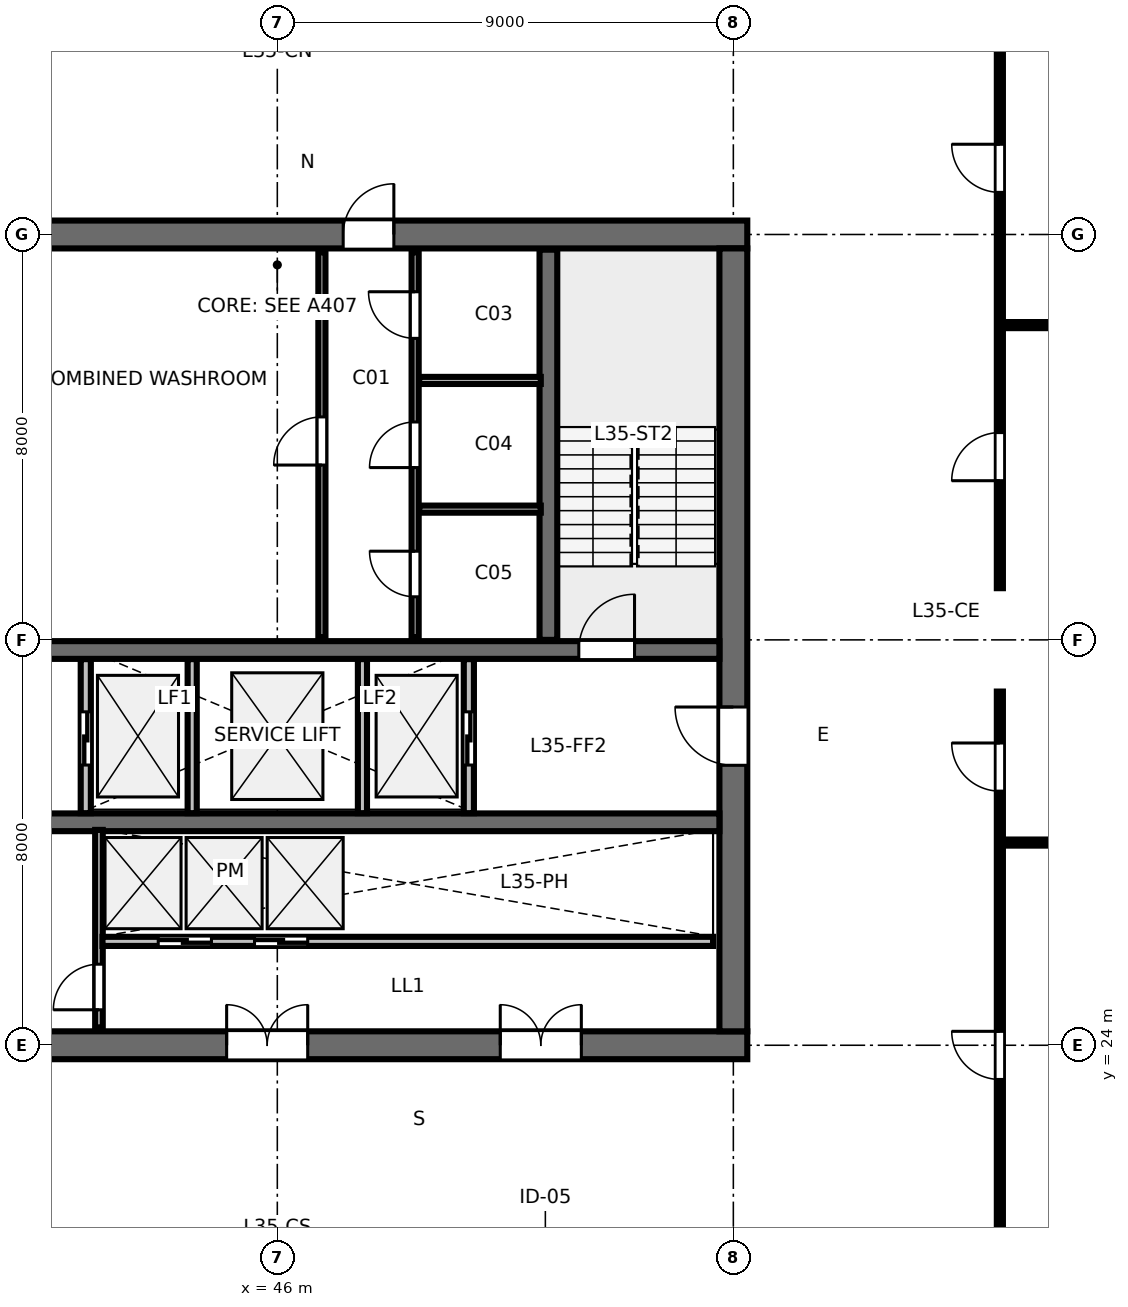
"""IFC4 building model, lengths in metres.
Left out: names, types, materials, properties, quantities, classifications, styles, units other than length and angle.
Written with IfcOpenShell. Run it as: python <this file> out.ifc"""

import sys

from ifc_helpers import new_model, si_unit, direction, frame, frame_2d, origin, place, context, subcontext, project, spatial, rectangle, extrude, element, fill, save


model = new_model("IFC4")
c1 = context("Model", 3, precision=1e-05, world=origin(), true_north=direction((0.0, 1.0)))
c2 = subcontext(c1, "Body", "Model", "MODEL_VIEW")
j1 = project(units=[si_unit("LENGTHUNIT", "METRE"), si_unit("PLANEANGLEUNIT", "RADIAN")], contexts=[c1])
p1 = place(None, origin())
s1 = spatial("IfcSite", under=j1, at=p1, CompositionType="ELEMENT")
p2 = place(p1, origin())
s2 = spatial("IfcBuilding", under=s1, at=p2, CompositionType="ELEMENT")
p3 = place(p2, frame((0.0, 0.0, 134.8)))
s3 = spatial("IfcBuildingStorey", under=s2, at=p3, CompositionType="ELEMENT", Elevation=134.8)
p4 = place(p3, frame((36.725, 24.0, 0.0), z_axis=(0.0, 0.0, 1.0), x_axis=(1.0, 0.0, 0.0)))
e1 = element("IfcWall", 1, at=p4, inside=s3, PredefinedType="SHEAR", context=c2, shape_type="SweptSolid", body=[
    extrude(rectangle(XDim=18.55, YDim=0.55, at=frame_2d((9.275, 0.0))), origin(), (0.0, 0.0, 1.0), 3.36),
])
p5 = place(p4, frame((8.275, 0.0, 0.0)))
e2 = element("IfcOpeningElement", 2, at=p5, cuts=e1, PredefinedType="OPENING", context=c2, shape_type="SweptSolid", body=[
    extrude(rectangle(XDim=1.6, YDim=2.15, at=frame_2d((0.8, 1.075))), frame((0.0, 0.285, 0.0), z_axis=(0.0, -1.0, 0.0), x_axis=(1.0, 0.0, 0.0)), (0.0, 0.0, 1.0), 0.57),
])
p6 = place(p4, frame((13.675, 0.0, 0.0)))
e3 = element("IfcOpeningElement", 3, at=p6, cuts=e1, PredefinedType="OPENING", context=c2, shape_type="SweptSolid", body=[
    extrude(rectangle(XDim=1.6, YDim=2.15, at=frame_2d((0.8, 1.075))), frame((0.0, 0.285, 0.0), z_axis=(0.0, -1.0, 0.0), x_axis=(1.0, 0.0, 0.0)), (0.0, 0.0, 1.0), 0.57),
])
p7 = place(p3, frame((36.725, 40.0, 0.0), z_axis=(0.0, 0.0, 1.0), x_axis=(1.0, 0.0, 0.0)))
e4 = element("IfcWall", 4, at=p7, inside=s3, PredefinedType="SHEAR", context=c2, shape_type="SweptSolid", body=[
    extrude(rectangle(XDim=18.55, YDim=0.55, at=frame_2d((9.275, 0.0))), origin(), (0.0, 0.0, 1.0), 3.36),
])
p8 = place(p7, frame((10.575, 0.0, 0.0)))
e5 = element("IfcOpeningElement", 5, at=p8, cuts=e4, PredefinedType="OPENING", context=c2, shape_type="SweptSolid", body=[
    extrude(rectangle(XDim=1.0, YDim=2.15, at=frame_2d((0.5, 1.075))), frame((0.0, 0.285, 0.0), z_axis=(0.0, -1.0, 0.0), x_axis=(1.0, 0.0, 0.0)), (0.0, 0.0, 1.0), 0.57),
])
p9 = place(p3, frame((55.0, 24.275, 0.0), z_axis=(0.0, 0.0, 1.0), x_axis=(0.0, 1.0, 0.0)))
e6 = element("IfcWall", 6, at=p9, inside=s3, PredefinedType="SHEAR", context=c2, shape_type="SweptSolid", body=[
    extrude(rectangle(XDim=15.45, YDim=0.55, at=frame_2d((7.725, 0.0))), origin(), (0.0, 0.0, 1.0), 3.36),
])
p10 = place(p9, frame((5.25, 0.0, 0.0)))
e7 = element("IfcOpeningElement", 7, at=p10, cuts=e6, PredefinedType="OPENING", context=c2, shape_type="SweptSolid", body=[
    extrude(rectangle(XDim=1.15, YDim=2.15, at=frame_2d((0.575, 1.075))), frame((0.0, 0.285, 0.0), z_axis=(0.0, -1.0, 0.0), x_axis=(1.0, 0.0, 0.0)), (0.0, 0.0, 1.0), 0.57),
])
p11 = place(p3, frame((37.275, 31.8, 0.0), z_axis=(0.0, 0.0, 1.0), x_axis=(1.0, 0.0, 0.0)))
e8 = element("IfcWall", 8, at=p11, inside=s3, PredefinedType="SHEAR", context=c2, shape_type="SweptSolid", body=[
    extrude(rectangle(XDim=17.45, YDim=0.35, at=frame_2d((8.725, 0.0))), origin(), (0.0, 0.0, 1.0), 3.36),
])
p12 = place(p11, frame((0.775, 0.0, 0.0)))
e9 = element("IfcOpeningElement", 9, at=p12, cuts=e8, PredefinedType="OPENING", context=c2, shape_type="SweptSolid", body=[
    extrude(rectangle(XDim=1.1, YDim=2.15, at=frame_2d((0.55, 1.075))), frame((0.0, 0.185, 0.0), z_axis=(0.0, -1.0, 0.0), x_axis=(1.0, 0.0, 0.0)), (0.0, 0.0, 1.0), 0.37),
])
p13 = place(p11, frame((14.675, 0.0, 0.0)))
e10 = element("IfcOpeningElement", 10, at=p13, cuts=e8, PredefinedType="OPENING", context=c2, shape_type="SweptSolid", body=[
    extrude(rectangle(XDim=1.1, YDim=2.15, at=frame_2d((0.55, 1.075))), frame((0.0, 0.185, 0.0), z_axis=(0.0, -1.0, 0.0), x_axis=(1.0, 0.0, 0.0)), (0.0, 0.0, 1.0), 0.37),
])
p14 = place(p3, frame((37.275, 28.4, 0.0), z_axis=(0.0, 0.0, 1.0), x_axis=(1.0, 0.0, 0.0)))
e11 = element("IfcWall", 11, at=p14, inside=s3, PredefinedType="SHEAR", context=c2, shape_type="SweptSolid", body=[
    extrude(rectangle(XDim=17.45, YDim=0.35, at=frame_2d((8.725, 0.0))), origin(), (0.0, 0.0, 1.0), 3.36),
])
p15 = place(p3, frame((51.35, 32.0, 0.0), z_axis=(0.0, 0.0, 1.0), x_axis=(0.0, 1.0, 0.0)))
e12 = element("IfcWall", 12, at=p15, inside=s3, PredefinedType="SHEAR", context=c2, shape_type="SweptSolid", body=[
    extrude(rectangle(XDim=7.7, YDim=0.35, at=frame_2d((3.85, 0.0))), origin(), (0.0, 0.0, 1.0), 3.6),
])
p16 = place(p3, frame((46.88, 32.05, 0.0), z_axis=(0.0, 0.0, 1.0), x_axis=(0.0, 1.0, 0.0)))
e13 = element("IfcWall", 13, at=p16, inside=s3, PredefinedType="PARTITIONING", context=c2, shape_type="SweptSolid", body=[
    extrude(rectangle(XDim=7.6, YDim=0.14, at=frame_2d((3.8, 0.0))), origin(), (0.0, 0.0, 1.0), 3.36),
])
p17 = place(p16, frame((3.4, 0.0, 0.0)))
e14 = element("IfcOpeningElement", 14, at=p17, cuts=e13, PredefinedType="OPENING", context=c2, shape_type="SweptSolid", body=[
    extrude(rectangle(XDim=0.95, YDim=2.15, at=frame_2d((0.475, 1.075))), frame((0.0, 0.08, 0.0), z_axis=(0.0, -1.0, 0.0), x_axis=(1.0, 0.0, 0.0)), (0.0, 0.0, 1.0), 0.16),
])
p18 = place(p3, frame((48.72, 32.05, 0.0), z_axis=(0.0, 0.0, 1.0), x_axis=(0.0, 1.0, 0.0)))
e15 = element("IfcWall", 15, at=p18, inside=s3, PredefinedType="PARTITIONING", context=c2, shape_type="SweptSolid", body=[
    extrude(rectangle(XDim=7.6, YDim=0.14, at=frame_2d((3.8, 0.0))), origin(), (0.0, 0.0, 1.0), 3.36),
])
p19 = place(p18, frame((0.8, 0.0, 0.0)))
e16 = element("IfcOpeningElement", 16, at=p19, cuts=e15, PredefinedType="OPENING", context=c2, shape_type="SweptSolid", body=[
    extrude(rectangle(XDim=0.9, YDim=2.15, at=frame_2d((0.45, 1.075))), frame((0.0, 0.08, 0.0), z_axis=(0.0, -1.0, 0.0), x_axis=(1.0, 0.0, 0.0)), (0.0, 0.0, 1.0), 0.16),
])
p20 = place(p18, frame((3.35, 0.0, 0.0)))
e17 = element("IfcOpeningElement", 17, at=p20, cuts=e15, PredefinedType="OPENING", context=c2, shape_type="SweptSolid", body=[
    extrude(rectangle(XDim=0.9, YDim=2.15, at=frame_2d((0.45, 1.075))), frame((0.0, 0.08, 0.0), z_axis=(0.0, -1.0, 0.0), x_axis=(1.0, 0.0, 0.0)), (0.0, 0.0, 1.0), 0.16),
])
p21 = place(p18, frame((5.9, 0.0, 0.0)))
e18 = element("IfcOpeningElement", 18, at=p21, cuts=e15, PredefinedType="OPENING", context=c2, shape_type="SweptSolid", body=[
    extrude(rectangle(XDim=0.92, YDim=2.15, at=frame_2d((0.46, 1.075))), frame((0.0, 0.08, 0.0), z_axis=(0.0, -1.0, 0.0), x_axis=(1.0, 0.0, 0.0)), (0.0, 0.0, 1.0), 0.16),
])
for number, where, z_axis, x_axis in (
    (19, (48.8, 34.58, 0.0), (0.0, 0.0, 1.0), (1.0, 0.0, 0.0)),
    (20, (48.8, 37.12, 0.0), (0.0, 0.0, 1.0), (1.0, 0.0, 0.0)),
):
    element("IfcWall", number, at=place(p3, frame(where, z_axis=z_axis, x_axis=x_axis)), inside=s3, PredefinedType="PARTITIONING", context=c2, shape_type="SweptSolid", body=[
        extrude(rectangle(XDim=2.4, YDim=0.14, at=frame_2d((1.2, 0.0))), origin(), (0.0, 0.0, 1.0), 3.36),
    ])
p22 = place(p3, frame((42.22, 28.58, 0.0), z_axis=(0.0, 0.0, 1.0), x_axis=(0.0, 1.0, 0.0)))
e21 = element("IfcWall", 21, at=p22, inside=s3, PredefinedType="PARTITIONING", context=c2, shape_type="SweptSolid", body=[
    extrude(rectangle(XDim=3.04, YDim=0.2, at=frame_2d((1.52, 0.0))), origin(), (0.0, 0.0, 1.0), 3.36),
])
p23 = place(p22, frame((0.95, 0.0, 0.0)))
e22 = element("IfcOpeningElement", 22, at=p23, cuts=e21, PredefinedType="OPENING", context=c2, shape_type="SweptSolid", body=[
    extrude(rectangle(XDim=1.05, YDim=2.15, at=frame_2d((0.525, 1.075))), frame((0.0, 0.11, 0.0), z_axis=(0.0, -1.0, 0.0), x_axis=(1.0, 0.0, 0.0)), (0.0, 0.0, 1.0), 0.22),
])
p24 = place(p3, frame((49.78, 28.58, 0.0), z_axis=(0.0, 0.0, 1.0), x_axis=(0.0, 1.0, 0.0)))
e23 = element("IfcWall", 23, at=p24, inside=s3, PredefinedType="PARTITIONING", context=c2, shape_type="SweptSolid", body=[
    extrude(rectangle(XDim=3.04, YDim=0.2, at=frame_2d((1.52, 0.0))), origin(), (0.0, 0.0, 1.0), 3.36),
])
p25 = place(p24, frame((0.95, 0.0, 0.0)))
e24 = element("IfcOpeningElement", 24, at=p25, cuts=e23, PredefinedType="OPENING", context=c2, shape_type="SweptSolid", body=[
    extrude(rectangle(XDim=1.05, YDim=2.15, at=frame_2d((0.525, 1.075))), frame((0.0, 0.11, 0.0), z_axis=(0.0, -1.0, 0.0), x_axis=(1.0, 0.0, 0.0)), (0.0, 0.0, 1.0), 0.22),
])
for number, where, z_axis, x_axis in (
    (25, (44.32, 28.58, 0.0), (0.0, 0.0, 1.0), (0.0, 1.0, 0.0)),
    (26, (47.68, 28.58, 0.0), (0.0, 0.0, 1.0), (0.0, 1.0, 0.0)),
):
    element("IfcWall", number, at=place(p3, frame(where, z_axis=z_axis, x_axis=x_axis)), inside=s3, PredefinedType="PARTITIONING", context=c2, shape_type="SweptSolid", body=[
        extrude(rectangle(XDim=3.04, YDim=0.18, at=frame_2d((1.52, 0.0))), origin(), (0.0, 0.0, 1.0), 3.36),
    ])
p26 = place(p3, frame((42.48, 24.35, 0.0), z_axis=(0.0, 0.0, 1.0), x_axis=(0.0, 1.0, 0.0)))
e27 = element("IfcWall", 27, at=p26, inside=s3, PredefinedType="PARTITIONING", context=c2, shape_type="SweptSolid", body=[
    extrude(rectangle(XDim=3.9, YDim=0.15, at=frame_2d((1.95, 0.0))), origin(), (0.0, 0.0, 1.0), 3.36),
])
p27 = place(p26, frame((0.35, 0.0, 0.0)))
e28 = element("IfcOpeningElement", 28, at=p27, cuts=e27, PredefinedType="OPENING", context=c2, shape_type="SweptSolid", body=[
    extrude(rectangle(XDim=0.9, YDim=2.15, at=frame_2d((0.45, 1.075))), frame((0.0, 0.085, 0.0), z_axis=(0.0, -1.0, 0.0), x_axis=(1.0, 0.0, 0.0)), (0.0, 0.0, 1.0), 0.17),
])
p28 = place(p3, frame((42.55, 26.05, 0.0), z_axis=(0.0, 0.0, 1.0), x_axis=(1.0, 0.0, 0.0)))
e29 = element("IfcWall", 29, at=p28, inside=s3, PredefinedType="PARTITIONING", context=c2, shape_type="SweptSolid", body=[
    extrude(rectangle(XDim=12.05, YDim=0.18, at=frame_2d((6.025, 0.0))), origin(), (0.0, 0.0, 1.0), 3.36),
])
p29 = place(p28, frame((1.1, 0.0, 0.0)))
e30 = element("IfcOpeningElement", 30, at=p29, cuts=e29, PredefinedType="OPENING", context=c2, shape_type="SweptSolid", body=[
    extrude(rectangle(XDim=1.05, YDim=2.15, at=frame_2d((0.525, 1.075))), frame((0.0, 0.1, 0.0), z_axis=(0.0, -1.0, 0.0), x_axis=(1.0, 0.0, 0.0)), (0.0, 0.0, 1.0), 0.2),
])
p30 = place(p28, frame((3.0, 0.0, 0.0)))
e31 = element("IfcOpeningElement", 31, at=p30, cuts=e29, PredefinedType="OPENING", context=c2, shape_type="SweptSolid", body=[
    extrude(rectangle(XDim=1.05, YDim=2.15, at=frame_2d((0.525, 1.075))), frame((0.0, 0.1, 0.0), z_axis=(0.0, -1.0, 0.0), x_axis=(1.0, 0.0, 0.0)), (0.0, 0.0, 1.0), 0.2),
])
p31 = place(p3, frame((60.26, 28.0, 0.0), z_axis=(0.0, 0.0, 1.0), x_axis=(1.0, 0.0, 0.0)))
e32 = element("IfcWall", 32, at=p31, inside=s3, PredefinedType="PARTITIONING", context=c2, shape_type="SweptSolid", body=[
    extrude(rectangle(XDim=8.26, YDim=0.12, at=frame_2d((4.13, 0.0))), origin(), (0.0, 0.0, 1.0), 2.64),
])
p32 = place(p31, frame((1.4, 0.0, 0.0)))
e33 = element("IfcOpeningElement", 33, at=p32, cuts=e32, PredefinedType="OPENING", context=c2, shape_type="SweptSolid", body=[
    extrude(rectangle(XDim=0.9, YDim=2.15, at=frame_2d((0.45, 1.075))), frame((0.0, 0.07, 0.0), z_axis=(0.0, -1.0, 0.0), x_axis=(1.0, 0.0, 0.0)), (0.0, 0.0, 1.0), 0.14),
])
p33 = place(p3, frame((60.26, 38.212, 0.0), z_axis=(0.0, 0.0, 1.0), x_axis=(1.0, 0.0, 0.0)))
e34 = element("IfcWall", 34, at=p33, inside=s3, PredefinedType="PARTITIONING", context=c2, shape_type="SweptSolid", body=[
    extrude(rectangle(XDim=8.26, YDim=0.12, at=frame_2d((4.13, 0.0))), origin(), (0.0, 0.0, 1.0), 2.64),
])
p34 = place(p33, frame((1.4, 0.0, 0.0)))
e35 = element("IfcOpeningElement", 35, at=p34, cuts=e34, PredefinedType="OPENING", context=c2, shape_type="SweptSolid", body=[
    extrude(rectangle(XDim=0.9, YDim=2.15, at=frame_2d((0.45, 1.075))), frame((0.0, 0.07, 0.0), z_axis=(0.0, -1.0, 0.0), x_axis=(1.0, 0.0, 0.0)), (0.0, 0.0, 1.0), 0.14),
])
p35 = place(p3, frame((60.26, 19.4, 0.0), z_axis=(0.0, 0.0, 1.0), x_axis=(0.0, 1.0, 0.0)))
e36 = element("IfcWall", 36, at=p35, inside=s3, PredefinedType="PARTITIONING", context=c2, shape_type="SweptSolid", body=[
    extrude(rectangle(XDim=11.58, YDim=0.12, at=frame_2d((5.79, 0.0))), origin(), (0.0, 0.0, 1.0), 2.64),
])
p36 = place(p35, frame((3.925, 0.0, 0.0)))
e37 = element("IfcOpeningElement", 37, at=p36, cuts=e36, PredefinedType="OPENING", context=c2, shape_type="SweptSolid", body=[
    extrude(rectangle(XDim=0.95, YDim=2.15, at=frame_2d((0.475, 1.075))), frame((0.0, 0.07, 0.0), z_axis=(0.0, -1.0, 0.0), x_axis=(1.0, 0.0, 0.0)), (0.0, 0.0, 1.0), 0.14),
])
p37 = place(p35, frame((9.615, 0.0, 0.0)))
e38 = element("IfcOpeningElement", 38, at=p37, cuts=e36, PredefinedType="OPENING", context=c2, shape_type="SweptSolid", body=[
    extrude(rectangle(XDim=0.95, YDim=2.15, at=frame_2d((0.475, 1.075))), frame((0.0, 0.07, 0.0), z_axis=(0.0, -1.0, 0.0), x_axis=(1.0, 0.0, 0.0)), (0.0, 0.0, 1.0), 0.14),
])
p38 = place(p3, frame((60.26, 33.02, 0.0), z_axis=(0.0, 0.0, 1.0), x_axis=(0.0, 1.0, 0.0)))
e39 = element("IfcWall", 39, at=p38, inside=s3, PredefinedType="PARTITIONING", context=c2, shape_type="SweptSolid", body=[
    extrude(rectangle(XDim=11.58, YDim=0.12, at=frame_2d((5.79, 0.0))), origin(), (0.0, 0.0, 1.0), 2.64),
])
p39 = place(p38, frame((2.121, 0.0, 0.0)))
e40 = element("IfcOpeningElement", 40, at=p39, cuts=e39, PredefinedType="OPENING", context=c2, shape_type="SweptSolid", body=[
    extrude(rectangle(XDim=0.95, YDim=2.15, at=frame_2d((0.475, 1.075))), frame((0.0, 0.07, 0.0), z_axis=(0.0, -1.0, 0.0), x_axis=(1.0, 0.0, 0.0)), (0.0, 0.0, 1.0), 0.14),
])
p40 = place(p38, frame((7.811, 0.0, 0.0)))
e41 = element("IfcOpeningElement", 41, at=p40, cuts=e39, PredefinedType="OPENING", context=c2, shape_type="SweptSolid", body=[
    extrude(rectangle(XDim=0.95, YDim=2.15, at=frame_2d((0.475, 1.075))), frame((0.0, 0.07, 0.0), z_axis=(0.0, -1.0, 0.0), x_axis=(1.0, 0.0, 0.0)), (0.0, 0.0, 1.0), 0.14),
])
p41 = place(p13, origin())
e42 = element("IfcDoor", 42, at=p41, inside=s3, OperationType="SINGLE_SWING_RIGHT", PredefinedType="DOOR", context=c2, shape_type="SweptSolid", body=[
    extrude(rectangle(XDim=1.1, YDim=2.15, at=frame_2d((0.55, 1.075))), frame((0.0, 0.025, 0.0), z_axis=(0.0, -1.0, 0.0), x_axis=(1.0, 0.0, 0.0)), (0.0, 0.0, 1.0), 0.05),
])
fill(e10, e42)
p42 = place(p8, origin())
e43 = element("IfcDoor", 43, at=p42, inside=s3, OperationType="SINGLE_SWING_RIGHT", PredefinedType="DOOR", context=c2, shape_type="SweptSolid", body=[
    extrude(rectangle(XDim=1.0, YDim=2.15, at=frame_2d((0.5, 1.075))), frame((0.0, 0.025, 0.0), z_axis=(0.0, -1.0, 0.0), x_axis=(1.0, 0.0, 0.0)), (0.0, 0.0, 1.0), 0.05),
])
fill(e5, e43)
p43 = place(p10, origin())
e44 = element("IfcDoor", 44, at=p43, inside=s3, OperationType="SINGLE_SWING_RIGHT", PredefinedType="DOOR", context=c2, shape_type="SweptSolid", body=[
    extrude(rectangle(XDim=1.15, YDim=2.15, at=frame_2d((0.575, 1.075))), frame((0.0, 0.025, 0.0), z_axis=(0.0, -1.0, 0.0), x_axis=(1.0, 0.0, 0.0)), (0.0, 0.0, 1.0), 0.05),
])
fill(e7, e44)
p44 = place(p5, origin())
e45 = element("IfcDoor", 45, at=p44, inside=s3, OperationType="DOUBLE_DOOR_SINGLE_SWING", PredefinedType="DOOR", context=c2, shape_type="SweptSolid", body=[
    extrude(rectangle(XDim=1.6, YDim=2.15, at=frame_2d((0.8, 1.075))), frame((0.0, 0.025, 0.0), z_axis=(0.0, -1.0, 0.0), x_axis=(1.0, 0.0, 0.0)), (0.0, 0.0, 1.0), 0.05),
])
fill(e2, e45)
p45 = place(p6, origin())
e46 = element("IfcDoor", 46, at=p45, inside=s3, OperationType="DOUBLE_DOOR_SINGLE_SWING", PredefinedType="DOOR", context=c2, shape_type="SweptSolid", body=[
    extrude(rectangle(XDim=1.6, YDim=2.15, at=frame_2d((0.8, 1.075))), frame((0.0, 0.025, 0.0), z_axis=(0.0, -1.0, 0.0), x_axis=(1.0, 0.0, 0.0)), (0.0, 0.0, 1.0), 0.05),
])
fill(e3, e46)
p46 = place(p17, origin())
e47 = element("IfcDoor", 47, at=p46, inside=s3, OperationType="SINGLE_SWING_LEFT", PredefinedType="DOOR", context=c2, shape_type="SweptSolid", body=[
    extrude(rectangle(XDim=0.95, YDim=2.15, at=frame_2d((0.475, 1.075))), frame((0.0, 0.025, 0.0), z_axis=(0.0, -1.0, 0.0), x_axis=(1.0, 0.0, 0.0)), (0.0, 0.0, 1.0), 0.05),
])
fill(e14, e47)
p47 = place(p19, origin())
e48 = element("IfcDoor", 48, at=p47, inside=s3, OperationType="SINGLE_SWING_RIGHT", PredefinedType="DOOR", context=c2, shape_type="SweptSolid", body=[
    extrude(rectangle(XDim=0.9, YDim=2.15, at=frame_2d((0.45, 1.075))), frame((0.0, 0.025, 0.0), z_axis=(0.0, -1.0, 0.0), x_axis=(1.0, 0.0, 0.0)), (0.0, 0.0, 1.0), 0.05),
])
fill(e16, e48)
p48 = place(p20, origin())
e49 = element("IfcDoor", 49, at=p48, inside=s3, OperationType="SINGLE_SWING_LEFT", PredefinedType="DOOR", context=c2, shape_type="SweptSolid", body=[
    extrude(rectangle(XDim=0.9, YDim=2.15, at=frame_2d((0.45, 1.075))), frame((0.0, 0.025, 0.0), z_axis=(0.0, -1.0, 0.0), x_axis=(1.0, 0.0, 0.0)), (0.0, 0.0, 1.0), 0.05),
])
fill(e17, e49)
p49 = place(p21, origin())
e50 = element("IfcDoor", 50, at=p49, inside=s3, OperationType="SINGLE_SWING_RIGHT", PredefinedType="DOOR", context=c2, shape_type="SweptSolid", body=[
    extrude(rectangle(XDim=0.92, YDim=2.15, at=frame_2d((0.46, 1.075))), frame((0.0, 0.025, 0.0), z_axis=(0.0, -1.0, 0.0), x_axis=(1.0, 0.0, 0.0)), (0.0, 0.0, 1.0), 0.05),
])
fill(e18, e50)
p50 = place(p23, origin())
e51 = element("IfcDoor", 51, at=p50, inside=s3, OperationType="SLIDING_TO_LEFT", PredefinedType="DOOR", context=c2, shape_type="SweptSolid", body=[
    extrude(rectangle(XDim=1.05, YDim=2.15, at=frame_2d((0.525, 1.075))), frame((0.0, 0.025, 0.0), z_axis=(0.0, -1.0, 0.0), x_axis=(1.0, 0.0, 0.0)), (0.0, 0.0, 1.0), 0.05),
])
fill(e22, e51)
p51 = place(p25, origin())
e52 = element("IfcDoor", 52, at=p51, inside=s3, OperationType="SLIDING_TO_RIGHT", PredefinedType="DOOR", context=c2, shape_type="SweptSolid", body=[
    extrude(rectangle(XDim=1.05, YDim=2.15, at=frame_2d((0.525, 1.075))), frame((0.0, 0.025, 0.0), z_axis=(0.0, -1.0, 0.0), x_axis=(1.0, 0.0, 0.0)), (0.0, 0.0, 1.0), 0.05),
])
fill(e24, e52)
p52 = place(p27, origin())
e53 = element("IfcDoor", 53, at=p52, inside=s3, OperationType="SINGLE_SWING_LEFT", PredefinedType="DOOR", context=c2, shape_type="SweptSolid", body=[
    extrude(rectangle(XDim=0.9, YDim=2.15, at=frame_2d((0.45, 1.075))), frame((0.0, 0.025, 0.0), z_axis=(0.0, -1.0, 0.0), x_axis=(1.0, 0.0, 0.0)), (0.0, 0.0, 1.0), 0.05),
])
fill(e28, e53)
p53 = place(p29, origin())
e54 = element("IfcDoor", 54, at=p53, inside=s3, OperationType="SLIDING_TO_LEFT", PredefinedType="DOOR", context=c2, shape_type="SweptSolid", body=[
    extrude(rectangle(XDim=1.05, YDim=2.15, at=frame_2d((0.525, 1.075))), frame((0.0, 0.025, 0.0), z_axis=(0.0, -1.0, 0.0), x_axis=(1.0, 0.0, 0.0)), (0.0, 0.0, 1.0), 0.05),
])
fill(e30, e54)
p54 = place(p30, origin())
e55 = element("IfcDoor", 55, at=p54, inside=s3, OperationType="SLIDING_TO_RIGHT", PredefinedType="DOOR", context=c2, shape_type="SweptSolid", body=[
    extrude(rectangle(XDim=1.05, YDim=2.15, at=frame_2d((0.525, 1.075))), frame((0.0, 0.025, 0.0), z_axis=(0.0, -1.0, 0.0), x_axis=(1.0, 0.0, 0.0)), (0.0, 0.0, 1.0), 0.05),
])
fill(e31, e55)
p55 = place(p36, origin())
e56 = element("IfcDoor", 56, at=p55, inside=s3, OperationType="SINGLE_SWING_RIGHT", PredefinedType="DOOR", context=c2, shape_type="SweptSolid", body=[
    extrude(rectangle(XDim=0.95, YDim=2.15, at=frame_2d((0.475, 1.075))), frame((0.0, 0.025, 0.0), z_axis=(0.0, -1.0, 0.0), x_axis=(1.0, 0.0, 0.0)), (0.0, 0.0, 1.0), 0.05),
])
fill(e37, e56)
p56 = place(p37, origin())
e57 = element("IfcDoor", 57, at=p56, inside=s3, OperationType="SINGLE_SWING_RIGHT", PredefinedType="DOOR", context=c2, shape_type="SweptSolid", body=[
    extrude(rectangle(XDim=0.95, YDim=2.15, at=frame_2d((0.475, 1.075))), frame((0.0, 0.025, 0.0), z_axis=(0.0, -1.0, 0.0), x_axis=(1.0, 0.0, 0.0)), (0.0, 0.0, 1.0), 0.05),
])
fill(e38, e57)
p57 = place(p39, origin())
e58 = element("IfcDoor", 58, at=p57, inside=s3, OperationType="SINGLE_SWING_LEFT", PredefinedType="DOOR", context=c2, shape_type="SweptSolid", body=[
    extrude(rectangle(XDim=0.95, YDim=2.15, at=frame_2d((0.475, 1.075))), frame((0.0, 0.025, 0.0), z_axis=(0.0, -1.0, 0.0), x_axis=(1.0, 0.0, 0.0)), (0.0, 0.0, 1.0), 0.05),
])
fill(e40, e58)
p58 = place(p40, origin())
e59 = element("IfcDoor", 59, at=p58, inside=s3, OperationType="SINGLE_SWING_RIGHT", PredefinedType="DOOR", context=c2, shape_type="SweptSolid", body=[
    extrude(rectangle(XDim=0.95, YDim=2.15, at=frame_2d((0.475, 1.075))), frame((0.0, 0.025, 0.0), z_axis=(0.0, -1.0, 0.0), x_axis=(1.0, 0.0, 0.0)), (0.0, 0.0, 1.0), 0.05),
])
fill(e41, e59)
save(model, sys.argv[1])
